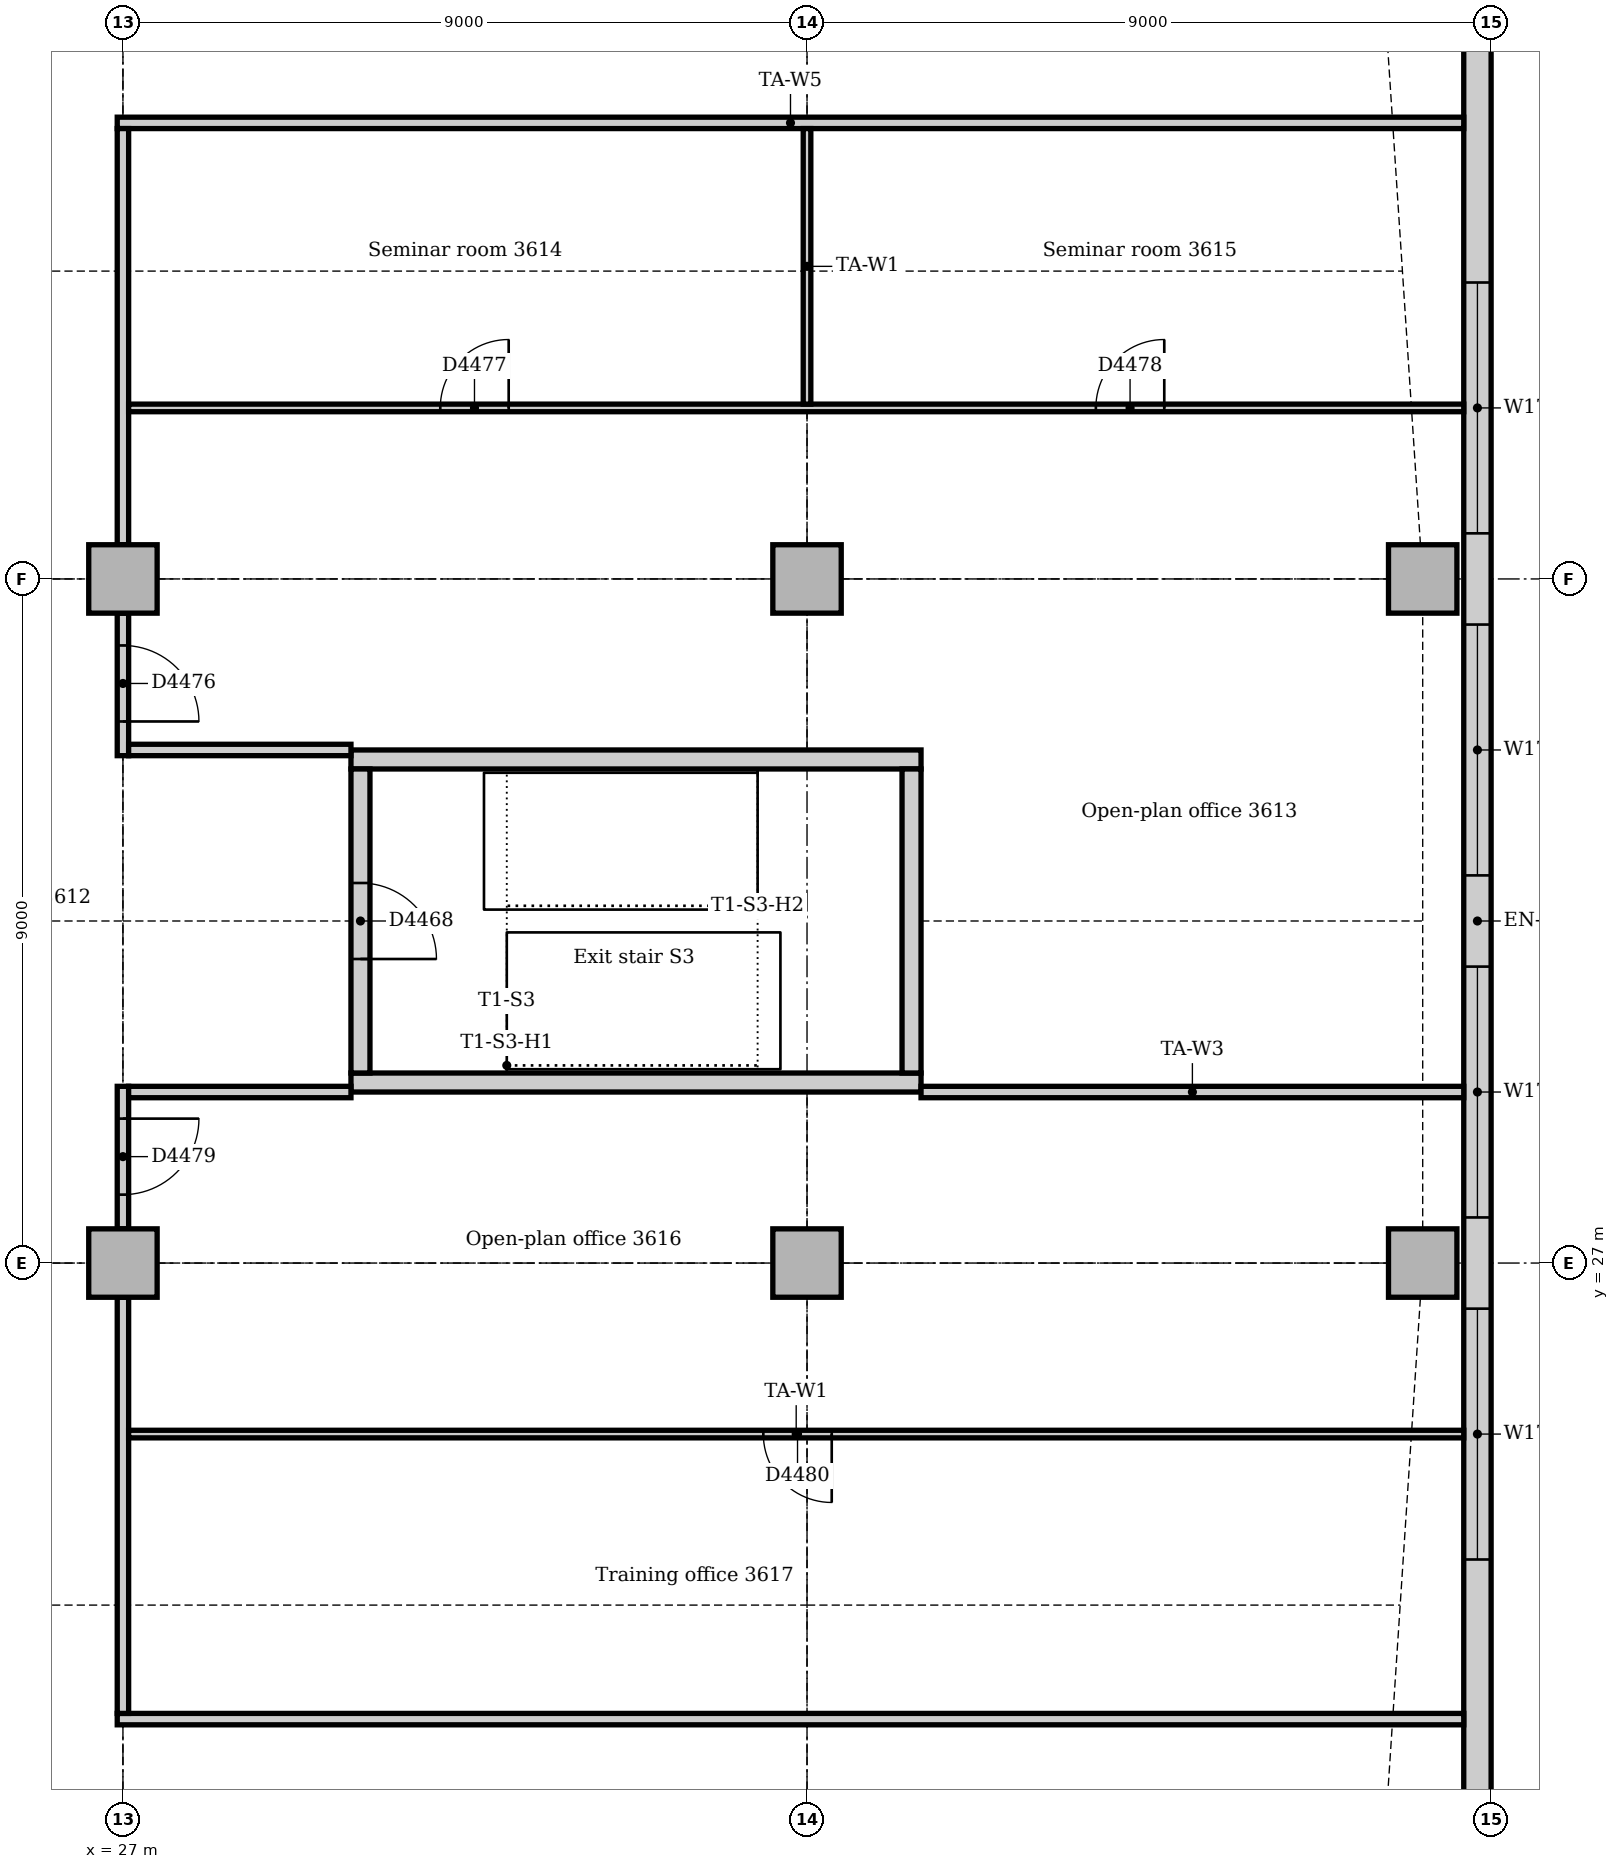
"""IFC4 building model, lengths in metres.
Left out: names, types, materials, properties, quantities, classifications, styles, units other than length and angle.
Written with IfcOpenShell. Run it as: python <this file> out.ifc"""

import sys

from ifc_helpers import new_model, si_unit, direction, frame, frame_2d, origin, origin_2d, place, context, subcontext, project, spatial, rectangle, extrude, element, fill, save


model = new_model("IFC4")
c1 = context("Model", 3, precision=1e-05, world=origin(), true_north=direction((0.0, 1.0)))
c2 = subcontext(c1, "Body", "Model", "MODEL_VIEW")
j1 = project(units=[si_unit("LENGTHUNIT", "METRE"), si_unit("PLANEANGLEUNIT", "RADIAN")], contexts=[c1])
p1 = place(None, origin())
s1 = spatial("IfcSite", under=j1, at=p1, CompositionType="ELEMENT")
p2 = place(p1, origin())
s2 = spatial("IfcBuilding", under=s1, at=p2, CompositionType="ELEMENT")
p3 = place(p2, frame((0.0, 0.0, 153.0)))
s3 = spatial("IfcBuildingStorey", under=s2, at=p3, CompositionType="ELEMENT", Elevation=153.0)
for number, where, z_axis, x_axis in (
    (1, (30.0, 29.375, 0.0), (0.0, 0.0, 1.0), (1.0, 0.0, 0.0)),
    (2, (37.5, 33.625, 0.0), (0.0, 0.0, 1.0), (-1.0, 0.0, 0.0)),
):
    element("IfcWall", number, at=place(p3, frame(where, z_axis=z_axis, x_axis=x_axis)), inside=s3, PredefinedType="SOLIDWALL", context=c2, shape_type="SweptSolid", body=[
        extrude(rectangle(XDim=7.5, YDim=0.25, at=frame_2d((3.75, 0.0))), origin(), (0.0, 0.0, 1.0), 4.0),
    ])
p4 = place(p3, frame((37.375, 29.5, 0.0), z_axis=(0.0, 0.0, 1.0), x_axis=(0.0, 1.0, 0.0)))
e3 = element("IfcWall", 3, at=p4, inside=s3, PredefinedType="SOLIDWALL", context=c2, shape_type="SweptSolid", body=[
    extrude(rectangle(XDim=4.0, YDim=0.25, at=frame_2d((2.0, 0.0))), origin(), (0.0, 0.0, 1.0), 4.0),
])
p5 = place(p3, frame((30.125, 33.5, 0.0), z_axis=(0.0, 0.0, 1.0), x_axis=(0.0, -1.0, 0.0)))
e4 = element("IfcWall", 4, at=p5, inside=s3, PredefinedType="SOLIDWALL", context=c2, shape_type="SweptSolid", body=[
    extrude(rectangle(XDim=4.0, YDim=0.25, at=frame_2d((2.0, 0.0))), origin(), (0.0, 0.0, 1.0), 4.0),
])
p6 = place(p5, frame((1.5, 0.0, 0.0)))
e5 = element("IfcOpeningElement", 5, at=p6, cuts=e4, PredefinedType="OPENING", context=c2, shape_type="SweptSolid", body=[
    extrude(rectangle(XDim=1.0, YDim=2.1, at=frame_2d((0.5, 1.05))), frame((0.0, 0.135, 0.0), z_axis=(0.0, -1.0, 0.0), x_axis=(1.0, 0.0, 0.0)), (0.0, 0.0, 1.0), 0.27),
])
for number, where, z_axis, x_axis in (
    (6, (44.1, 27.0, 0.0), (0.0, 0.0, 1.0), (1.0, 0.0, 0.0)),
    (7, (44.1, 36.0, 0.0), (0.0, 0.0, 1.0), (1.0, 0.0, 0.0)),
    (8, (27.0, 27.0, 0.0), (0.0, 0.0, 1.0), (1.0, 0.0, 0.0)),
    (9, (27.0, 36.0, 0.0), (0.0, 0.0, 1.0), (1.0, 0.0, 0.0)),
    (10, (36.0, 27.0, 0.0), (0.0, 0.0, 1.0), (1.0, 0.0, 0.0)),
    (11, (36.0, 36.0, 0.0), (0.0, 0.0, 1.0), (1.0, 0.0, 0.0)),
):
    element("IfcColumn", number, at=place(p3, frame(where, z_axis=z_axis, x_axis=x_axis)), inside=s3, PredefinedType="COLUMN", context=c2, shape_type="SweptSolid", body=[
        extrude(rectangle(XDim=0.9, YDim=0.9, at=origin_2d()), origin(), (0.0, 0.0, 1.0), 3.85),
    ])
p7 = place(p3, frame((44.82, 19.243, 0.0), z_axis=(0.0, 0.0, 1.0), x_axis=(0.0, 1.0, 0.0)))
e12 = element("IfcWall", 12, at=p7, inside=s3, PredefinedType="STANDARD", context=c2, shape_type="SweptSolid", body=[
    extrude(rectangle(XDim=24.515, YDim=0.36, at=frame_2d((12.257, 0.0))), origin(), (0.0, 0.0, 1.0), 3.85),
])
p8 = place(p7, frame((3.857, 0.0, 0.9)))
e13 = element("IfcOpeningElement", 13, at=p8, cuts=e12, PredefinedType="OPENING", context=c2, shape_type="SweptSolid", body=[
    extrude(rectangle(XDim=3.3, YDim=1.6, at=frame_2d((1.65, 0.8))), frame((0.0, 0.19, 0.0), z_axis=(0.0, -1.0, 0.0), x_axis=(1.0, 0.0, 0.0)), (0.0, 0.0, 1.0), 0.38),
])
p9 = place(p7, frame((8.357, 0.0, 0.9)))
e14 = element("IfcOpeningElement", 14, at=p9, cuts=e12, PredefinedType="OPENING", context=c2, shape_type="SweptSolid", body=[
    extrude(rectangle(XDim=3.3, YDim=1.6, at=frame_2d((1.65, 0.8))), frame((0.0, 0.19, 0.0), z_axis=(0.0, -1.0, 0.0), x_axis=(1.0, 0.0, 0.0)), (0.0, 0.0, 1.0), 0.38),
])
p10 = place(p7, frame((12.857, 0.0, 0.9)))
e15 = element("IfcOpeningElement", 15, at=p10, cuts=e12, PredefinedType="OPENING", context=c2, shape_type="SweptSolid", body=[
    extrude(rectangle(XDim=3.3, YDim=1.6, at=frame_2d((1.65, 0.8))), frame((0.0, 0.19, 0.0), z_axis=(0.0, -1.0, 0.0), x_axis=(1.0, 0.0, 0.0)), (0.0, 0.0, 1.0), 0.38),
])
p11 = place(p7, frame((17.357, 0.0, 0.9)))
e16 = element("IfcOpeningElement", 16, at=p11, cuts=e12, PredefinedType="OPENING", context=c2, shape_type="SweptSolid", body=[
    extrude(rectangle(XDim=3.3, YDim=1.6, at=frame_2d((1.65, 0.8))), frame((0.0, 0.19, 0.0), z_axis=(0.0, -1.0, 0.0), x_axis=(1.0, 0.0, 0.0)), (0.0, 0.0, 1.0), 0.38),
])
for number, where, z_axis, x_axis in (
    (17, (26.925, 21.0, 0.0), (0.0, 0.0, 1.0), (1.0, 0.0, 0.0)),
    (18, (26.925, 42.0, 0.0), (0.0, 0.0, 1.0), (1.0, 0.0, 0.0)),
):
    element("IfcWall", number, at=place(p3, frame(where, z_axis=z_axis, x_axis=x_axis)), inside=s3, PredefinedType="PARTITIONING", context=c2, shape_type="SweptSolid", body=[
        extrude(rectangle(XDim=17.715, YDim=0.15, at=frame_2d((8.857, 0.0))), origin(), (0.0, 0.0, 1.0), 3.85),
    ])
p12 = place(p3, frame((27.0, 21.075, 0.0), z_axis=(0.0, 0.0, 1.0), x_axis=(0.0, 1.0, 0.0)))
e19 = element("IfcWall", 19, at=p12, inside=s3, PredefinedType="PARTITIONING", context=c2, shape_type="SweptSolid", body=[
    extrude(rectangle(XDim=5.475, YDim=0.15, at=frame_2d((2.737, 0.0))), origin(), (0.0, 0.0, 1.0), 3.362),
])
p13 = place(p3, frame((27.0, 27.45, 0.0), z_axis=(0.0, 0.0, 1.0), x_axis=(0.0, 1.0, 0.0)))
e20 = element("IfcWall", 20, at=p13, inside=s3, PredefinedType="PARTITIONING", context=c2, shape_type="SweptSolid", body=[
    extrude(rectangle(XDim=1.875, YDim=0.15, at=frame_2d((0.938, 0.0))), origin(), (0.0, 0.0, 1.0), 3.362),
])
p14 = place(p13, frame((0.45, 0.0, 0.0)))
e21 = element("IfcOpeningElement", 21, at=p14, cuts=e20, PredefinedType="OPENING", context=c2, shape_type="SweptSolid", body=[
    extrude(rectangle(XDim=1.0, YDim=2.1, at=frame_2d((0.5, 1.05))), frame((0.0, 0.085, 0.0), z_axis=(0.0, -1.0, 0.0), x_axis=(1.0, 0.0, 0.0)), (0.0, 0.0, 1.0), 0.17),
])
p15 = place(p3, frame((27.0, 33.675, 0.0), z_axis=(0.0, 0.0, 1.0), x_axis=(0.0, 1.0, 0.0)))
e22 = element("IfcWall", 22, at=p15, inside=s3, PredefinedType="PARTITIONING", context=c2, shape_type="SweptSolid", body=[
    extrude(rectangle(XDim=1.875, YDim=0.15, at=frame_2d((0.938, 0.0))), origin(), (0.0, 0.0, 1.0), 3.362),
])
p16 = place(p15, frame((0.45, 0.0, 0.0)))
e23 = element("IfcOpeningElement", 23, at=p16, cuts=e22, PredefinedType="OPENING", context=c2, shape_type="SweptSolid", body=[
    extrude(rectangle(XDim=1.0, YDim=2.1, at=frame_2d((0.5, 1.05))), frame((0.0, 0.085, 0.0), z_axis=(0.0, -1.0, 0.0), x_axis=(1.0, 0.0, 0.0)), (0.0, 0.0, 1.0), 0.17),
])
p17 = place(p3, frame((27.0, 36.45, 0.0), z_axis=(0.0, 0.0, 1.0), x_axis=(0.0, 1.0, 0.0)))
e24 = element("IfcWall", 24, at=p17, inside=s3, PredefinedType="PARTITIONING", context=c2, shape_type="SweptSolid", body=[
    extrude(rectangle(XDim=5.475, YDim=0.15, at=frame_2d((2.737, 0.0))), origin(), (0.0, 0.0, 1.0), 3.362),
])
for number, where, z_axis, x_axis in (
    (25, (27.075, 29.25, 0.0), (0.0, 0.0, 1.0), (1.0, 0.0, 0.0)),
    (26, (27.075, 33.75, 0.0), (0.0, 0.0, 1.0), (1.0, 0.0, 0.0)),
):
    element("IfcWall", number, at=place(p3, frame(where, z_axis=z_axis, x_axis=x_axis)), inside=s3, PredefinedType="PARTITIONING", context=c2, shape_type="SweptSolid", body=[
        extrude(rectangle(XDim=2.925, YDim=0.15, at=frame_2d((1.462, 0.0))), origin(), (0.0, 0.0, 1.0), 3.85),
    ])
p18 = place(p3, frame((37.5, 29.25, 0.0), z_axis=(0.0, 0.0, 1.0), x_axis=(1.0, 0.0, 0.0)))
e27 = element("IfcWall", 27, at=p18, inside=s3, PredefinedType="PARTITIONING", context=c2, shape_type="SweptSolid", body=[
    extrude(rectangle(XDim=7.14, YDim=0.15, at=frame_2d((3.57, 0.0))), origin(), (0.0, 0.0, 1.0), 3.85),
])
p19 = place(p3, frame((27.075, 24.75, 0.0), z_axis=(0.0, 0.0, 1.0), x_axis=(1.0, 0.0, 0.0)))
e28 = element("IfcWall", 28, at=p19, inside=s3, PredefinedType="PARTITIONING", context=c2, shape_type="SweptSolid", body=[
    extrude(rectangle(XDim=17.565, YDim=0.1, at=frame_2d((8.783, 0.0))), origin(), (0.0, 0.0, 1.0), 3.85),
])
p20 = place(p19, frame((8.35, 0.0, 0.0)))
e29 = element("IfcOpeningElement", 29, at=p20, cuts=e28, PredefinedType="OPENING", context=c2, shape_type="SweptSolid", body=[
    extrude(rectangle(XDim=0.9, YDim=2.1, at=frame_2d((0.45, 1.05))), frame((0.0, 0.06, 0.0), z_axis=(0.0, -1.0, 0.0), x_axis=(1.0, 0.0, 0.0)), (0.0, 0.0, 1.0), 0.12),
])
p21 = place(p3, frame((27.075, 38.25, 0.0), z_axis=(0.0, 0.0, 1.0), x_axis=(1.0, 0.0, 0.0)))
e30 = element("IfcWall", 30, at=p21, inside=s3, PredefinedType="PARTITIONING", context=c2, shape_type="SweptSolid", body=[
    extrude(rectangle(XDim=17.565, YDim=0.1, at=frame_2d((8.783, 0.0))), origin(), (0.0, 0.0, 1.0), 3.85),
])
p22 = place(p21, frame((4.1, 0.0, 0.0)))
e31 = element("IfcOpeningElement", 31, at=p22, cuts=e30, PredefinedType="OPENING", context=c2, shape_type="SweptSolid", body=[
    extrude(rectangle(XDim=0.9, YDim=2.1, at=frame_2d((0.45, 1.05))), frame((0.0, 0.06, 0.0), z_axis=(0.0, -1.0, 0.0), x_axis=(1.0, 0.0, 0.0)), (0.0, 0.0, 1.0), 0.12),
])
p23 = place(p21, frame((12.725, 0.0, 0.0)))
e32 = element("IfcOpeningElement", 32, at=p23, cuts=e30, PredefinedType="OPENING", context=c2, shape_type="SweptSolid", body=[
    extrude(rectangle(XDim=0.9, YDim=2.1, at=frame_2d((0.45, 1.05))), frame((0.0, 0.06, 0.0), z_axis=(0.0, -1.0, 0.0), x_axis=(1.0, 0.0, 0.0)), (0.0, 0.0, 1.0), 0.12),
])
p24 = place(p3, frame((36.0, 38.3, 0.0), z_axis=(0.0, 0.0, 1.0), x_axis=(0.0, 1.0, 0.0)))
e33 = element("IfcWall", 33, at=p24, inside=s3, PredefinedType="PARTITIONING", context=c2, shape_type="SweptSolid", body=[
    extrude(rectangle(XDim=3.625, YDim=0.1, at=frame_2d((1.812, 0.0))), origin(), (0.0, 0.0, 1.0), 3.362),
])
p25 = place(p8, origin())
e34 = element("IfcWindow", 34, at=p25, inside=s3, PartitioningType="SINGLE_PANEL", PredefinedType="WINDOW", context=c2, shape_type="SweptSolid", body=[
    extrude(rectangle(XDim=3.3, YDim=1.6, at=frame_2d((1.65, 0.8))), frame((0.0, 0.13, 0.0), z_axis=(0.0, -1.0, 0.0), x_axis=(1.0, 0.0, 0.0)), (0.0, 0.0, 1.0), 0.06),
])
fill(e13, e34)
p26 = place(p9, origin())
e35 = element("IfcWindow", 35, at=p26, inside=s3, PartitioningType="SINGLE_PANEL", PredefinedType="WINDOW", context=c2, shape_type="SweptSolid", body=[
    extrude(rectangle(XDim=3.3, YDim=1.6, at=frame_2d((1.65, 0.8))), frame((0.0, 0.13, 0.0), z_axis=(0.0, -1.0, 0.0), x_axis=(1.0, 0.0, 0.0)), (0.0, 0.0, 1.0), 0.06),
])
fill(e14, e35)
p27 = place(p10, origin())
e36 = element("IfcWindow", 36, at=p27, inside=s3, PartitioningType="SINGLE_PANEL", PredefinedType="WINDOW", context=c2, shape_type="SweptSolid", body=[
    extrude(rectangle(XDim=3.3, YDim=1.6, at=frame_2d((1.65, 0.8))), frame((0.0, 0.13, 0.0), z_axis=(0.0, -1.0, 0.0), x_axis=(1.0, 0.0, 0.0)), (0.0, 0.0, 1.0), 0.06),
])
fill(e15, e36)
p28 = place(p11, origin())
e37 = element("IfcWindow", 37, at=p28, inside=s3, PartitioningType="SINGLE_PANEL", PredefinedType="WINDOW", context=c2, shape_type="SweptSolid", body=[
    extrude(rectangle(XDim=3.3, YDim=1.6, at=frame_2d((1.65, 0.8))), frame((0.0, 0.13, 0.0), z_axis=(0.0, -1.0, 0.0), x_axis=(1.0, 0.0, 0.0)), (0.0, 0.0, 1.0), 0.06),
])
fill(e16, e37)
p29 = place(p6, origin())
e38 = element("IfcDoor", 38, at=p29, inside=s3, OperationType="SINGLE_SWING_RIGHT", PredefinedType="DOOR", context=c2, shape_type="SweptSolid", body=[
    extrude(rectangle(XDim=1.0, YDim=2.1, at=frame_2d((0.5, 1.05))), frame((0.0, 0.025, 0.0), z_axis=(0.0, -1.0, 0.0), x_axis=(1.0, 0.0, 0.0)), (0.0, 0.0, 1.0), 0.05),
])
fill(e5, e38)
p30 = place(p16, frame((1.0, 0.0, 0.0), z_axis=(0.0, 0.0, 1.0), x_axis=(-1.0, 0.0, 0.0)))
e39 = element("IfcDoor", 39, at=p30, inside=s3, OperationType="SINGLE_SWING_RIGHT", PredefinedType="DOOR", context=c2, shape_type="SweptSolid", body=[
    extrude(rectangle(XDim=1.0, YDim=2.1, at=frame_2d((0.5, 1.05))), frame((0.0, 0.025, 0.0), z_axis=(0.0, -1.0, 0.0), x_axis=(1.0, 0.0, 0.0)), (0.0, 0.0, 1.0), 0.05),
])
fill(e23, e39)
p31 = place(p22, origin())
e40 = element("IfcDoor", 40, at=p31, inside=s3, OperationType="SINGLE_SWING_RIGHT", PredefinedType="DOOR", context=c2, shape_type="SweptSolid", body=[
    extrude(rectangle(XDim=0.9, YDim=2.1, at=frame_2d((0.45, 1.05))), frame((0.0, 0.025, 0.0), z_axis=(0.0, -1.0, 0.0), x_axis=(1.0, 0.0, 0.0)), (0.0, 0.0, 1.0), 0.05),
])
fill(e31, e40)
p32 = place(p23, origin())
e41 = element("IfcDoor", 41, at=p32, inside=s3, OperationType="SINGLE_SWING_RIGHT", PredefinedType="DOOR", context=c2, shape_type="SweptSolid", body=[
    extrude(rectangle(XDim=0.9, YDim=2.1, at=frame_2d((0.45, 1.05))), frame((0.0, 0.025, 0.0), z_axis=(0.0, -1.0, 0.0), x_axis=(1.0, 0.0, 0.0)), (0.0, 0.0, 1.0), 0.05),
])
fill(e32, e41)
p33 = place(p14, frame((1.0, 0.0, 0.0), z_axis=(0.0, 0.0, 1.0), x_axis=(-1.0, 0.0, 0.0)))
e42 = element("IfcDoor", 42, at=p33, inside=s3, OperationType="SINGLE_SWING_LEFT", PredefinedType="DOOR", context=c2, shape_type="SweptSolid", body=[
    extrude(rectangle(XDim=1.0, YDim=2.1, at=frame_2d((0.5, 1.05))), frame((0.0, 0.025, 0.0), z_axis=(0.0, -1.0, 0.0), x_axis=(1.0, 0.0, 0.0)), (0.0, 0.0, 1.0), 0.05),
])
fill(e21, e42)
p34 = place(p20, frame((0.9, 0.0, 0.0), z_axis=(0.0, 0.0, 1.0), x_axis=(-1.0, 0.0, 0.0)))
e43 = element("IfcDoor", 43, at=p34, inside=s3, OperationType="SINGLE_SWING_LEFT", PredefinedType="DOOR", context=c2, shape_type="SweptSolid", body=[
    extrude(rectangle(XDim=0.9, YDim=2.1, at=frame_2d((0.45, 1.05))), frame((0.0, 0.025, 0.0), z_axis=(0.0, -1.0, 0.0), x_axis=(1.0, 0.0, 0.0)), (0.0, 0.0, 1.0), 0.05),
])
fill(e29, e43)
save(model, sys.argv[1])
